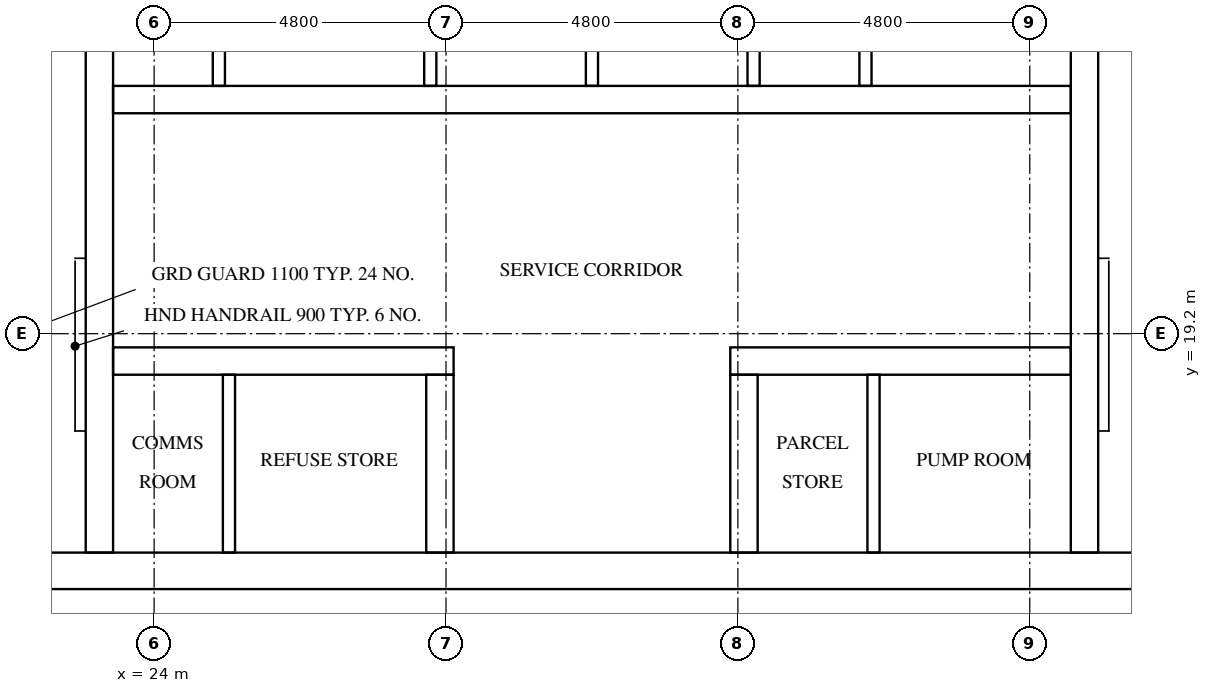
"""IFC4 building model, lengths in metres.
Left out: names, types, materials, properties, quantities, classifications, styles, units other than length and angle.
Written with IfcOpenShell. Run it as: python <this file> out.ifc"""

import sys

from ifc_helpers import new_model, si_unit, direction, frame, frame_2d, origin, place, context, subcontext, project, spatial, rectangle, extrude, element, fill, save


model = new_model("IFC4")
c1 = context("Model", 3, precision=1e-05, world=origin(), true_north=direction((0.0, 1.0)))
c2 = subcontext(c1, "Body", "Model", "MODEL_VIEW")
j1 = project(units=[si_unit("LENGTHUNIT", "METRE"), si_unit("PLANEANGLEUNIT", "RADIAN")], contexts=[c1])
p1 = place(None, origin())
s1 = spatial("IfcSite", under=j1, at=p1, CompositionType="ELEMENT")
p2 = place(p1, origin())
s2 = spatial("IfcBuilding", under=s1, at=p2, CompositionType="ELEMENT")
p3 = place(p2, frame((0.0, 0.0, 245.7)))
s3 = spatial("IfcBuildingStorey", under=s2, at=p3, CompositionType="ELEMENT", Elevation=245.7)
p4 = place(p3, frame((15.0, 15.3, 0.0), z_axis=(0.0, 0.0, 1.0), x_axis=(1.0, 0.0, 0.0)))
e1 = element("IfcWall", 1, at=p4, inside=s3, PredefinedType="SHEAR", context=c2, shape_type="SweptSolid", body=[
    extrude(rectangle(XDim=32.4, YDim=0.6, at=frame_2d((16.2, 0.0))), origin(), (0.0, 0.0, 1.0), 3.2),
])
p5 = place(p4, frame((15.3, 0.0, 0.0)))
e2 = element("IfcOpeningElement", 2, at=p5, cuts=e1, PredefinedType="OPENING", context=c2, shape_type="SweptSolid", body=[
    extrude(rectangle(XDim=1.8, YDim=2.1, at=frame_2d((0.9, 1.05))), frame((0.0, 0.31, 0.0), z_axis=(0.0, -1.0, 0.0), x_axis=(1.0, 0.0, 0.0)), (0.0, 0.0, 1.0), 0.62),
])
p6 = place(p3, frame((23.1, 15.6, 0.0), z_axis=(0.0, 0.0, 1.0), x_axis=(0.0, 1.0, 0.0)))
e3 = element("IfcWall", 3, at=p6, inside=s3, PredefinedType="SHEAR", context=c2, shape_type="SweptSolid", body=[
    extrude(rectangle(XDim=21.6, YDim=0.45, at=frame_2d((10.8, 0.0))), origin(), (0.0, 0.0, 1.0), 3.2),
])
p7 = place(p3, frame((39.3, 15.6, 0.0), z_axis=(0.0, 0.0, 1.0), x_axis=(0.0, 1.0, 0.0)))
e4 = element("IfcWall", 4, at=p7, inside=s3, PredefinedType="SHEAR", context=c2, shape_type="SweptSolid", body=[
    extrude(rectangle(XDim=8.65, YDim=0.45, at=frame_2d((4.325, 0.0))), origin(), (0.0, 0.0, 1.0), 3.2),
])
p8 = place(p3, frame((23.325, 18.75, 0.0), z_axis=(0.0, 0.0, 1.0), x_axis=(1.0, 0.0, 0.0)))
e5 = element("IfcWall", 5, at=p8, inside=s3, PredefinedType="SHEAR", context=c2, shape_type="SweptSolid", body=[
    extrude(rectangle(XDim=5.6, YDim=0.45, at=frame_2d((2.8, 0.0))), origin(), (0.0, 0.0, 1.0), 3.2),
])
p9 = place(p8, frame((0.403, 0.0, 0.0)))
e6 = element("IfcOpeningElement", 6, at=p9, cuts=e5, PredefinedType="OPENING", context=c2, shape_type="SweptSolid", body=[
    extrude(rectangle(XDim=1.0, YDim=2.1, at=frame_2d((0.5, 1.05))), frame((0.0, 0.235, 0.0), z_axis=(0.0, -1.0, 0.0), x_axis=(1.0, 0.0, 0.0)), (0.0, 0.0, 1.0), 0.47),
])
p10 = place(p8, frame((3.078, 0.0, 0.0)))
e7 = element("IfcOpeningElement", 7, at=p10, cuts=e5, PredefinedType="OPENING", context=c2, shape_type="SweptSolid", body=[
    extrude(rectangle(XDim=1.0, YDim=2.1, at=frame_2d((0.5, 1.05))), frame((0.0, 0.235, 0.0), z_axis=(0.0, -1.0, 0.0), x_axis=(1.0, 0.0, 0.0)), (0.0, 0.0, 1.0), 0.47),
])
p11 = place(p3, frame((33.475, 18.75, 0.0), z_axis=(0.0, 0.0, 1.0), x_axis=(1.0, 0.0, 0.0)))
e8 = element("IfcWall", 8, at=p11, inside=s3, PredefinedType="SHEAR", context=c2, shape_type="SweptSolid", body=[
    extrude(rectangle(XDim=5.6, YDim=0.45, at=frame_2d((2.8, 0.0))), origin(), (0.0, 0.0, 1.0), 3.2),
])
p12 = place(p11, frame((0.853, 0.0, 0.0)))
e9 = element("IfcOpeningElement", 9, at=p12, cuts=e8, PredefinedType="OPENING", context=c2, shape_type="SweptSolid", body=[
    extrude(rectangle(XDim=1.0, YDim=2.1, at=frame_2d((0.5, 1.05))), frame((0.0, 0.235, 0.0), z_axis=(0.0, -1.0, 0.0), x_axis=(1.0, 0.0, 0.0)), (0.0, 0.0, 1.0), 0.47),
])
p13 = place(p11, frame((3.528, 0.0, 0.0)))
e10 = element("IfcOpeningElement", 10, at=p13, cuts=e8, PredefinedType="OPENING", context=c2, shape_type="SweptSolid", body=[
    extrude(rectangle(XDim=1.0, YDim=2.1, at=frame_2d((0.5, 1.05))), frame((0.0, 0.235, 0.0), z_axis=(0.0, -1.0, 0.0), x_axis=(1.0, 0.0, 0.0)), (0.0, 0.0, 1.0), 0.47),
])
p14 = place(p3, frame((23.325, 23.05, 0.0), z_axis=(0.0, 0.0, 1.0), x_axis=(1.0, 0.0, 0.0)))
e11 = element("IfcWall", 11, at=p14, inside=s3, PredefinedType="SHEAR", context=c2, shape_type="SweptSolid", body=[
    extrude(rectangle(XDim=15.75, YDim=0.45, at=frame_2d((7.875, 0.0))), origin(), (0.0, 0.0, 1.0), 3.2),
])
p15 = place(p14, frame((0.32, 0.0, 0.0)))
e12 = element("IfcOpeningElement", 12, at=p15, cuts=e11, PredefinedType="OPENING", context=c2, shape_type="SweptSolid", body=[
    extrude(rectangle(XDim=1.0, YDim=2.1, at=frame_2d((0.5, 1.05))), frame((0.0, 0.235, 0.0), z_axis=(0.0, -1.0, 0.0), x_axis=(1.0, 0.0, 0.0)), (0.0, 0.0, 1.0), 0.47),
])
p16 = place(p14, frame((2.978, 0.0, 0.0)))
e13 = element("IfcOpeningElement", 13, at=p16, cuts=e11, PredefinedType="OPENING", context=c2, shape_type="SweptSolid", body=[
    extrude(rectangle(XDim=1.0, YDim=2.1, at=frame_2d((0.5, 1.05))), frame((0.0, 0.235, 0.0), z_axis=(0.0, -1.0, 0.0), x_axis=(1.0, 0.0, 0.0)), (0.0, 0.0, 1.0), 0.47),
])
p17 = place(p14, frame((10.953, 0.0, 0.0)))
e14 = element("IfcOpeningElement", 14, at=p17, cuts=e11, PredefinedType="OPENING", context=c2, shape_type="SweptSolid", body=[
    extrude(rectangle(XDim=1.0, YDim=2.1, at=frame_2d((0.5, 1.05))), frame((0.0, 0.235, 0.0), z_axis=(0.0, -1.0, 0.0), x_axis=(1.0, 0.0, 0.0)), (0.0, 0.0, 1.0), 0.47),
])
p18 = place(p14, frame((13.612, 0.0, 0.0)))
e15 = element("IfcOpeningElement", 15, at=p18, cuts=e11, PredefinedType="OPENING", context=c2, shape_type="SweptSolid", body=[
    extrude(rectangle(XDim=1.0, YDim=2.1, at=frame_2d((0.5, 1.05))), frame((0.0, 0.235, 0.0), z_axis=(0.0, -1.0, 0.0), x_axis=(1.0, 0.0, 0.0)), (0.0, 0.0, 1.0), 0.47),
])
for number, where, z_axis, x_axis in (
    (16, (28.7, 15.6, 0.0), (0.0, 0.0, 1.0), (0.0, 1.0, 0.0)),
    (17, (33.7, 15.6, 0.0), (0.0, 0.0, 1.0), (0.0, 1.0, 0.0)),
):
    element("IfcWall", number, at=place(p3, frame(where, z_axis=z_axis, x_axis=x_axis)), inside=s3, PredefinedType="SHEAR", context=c2, shape_type="SweptSolid", body=[
        extrude(rectangle(XDim=2.925, YDim=0.45, at=frame_2d((1.462, 0.0))), origin(), (0.0, 0.0, 1.0), 3.2),
    ])
for number, where, z_axis, x_axis in (
    (18, (28.542, 23.275, 0.0), (0.0, 0.0, 1.0), (0.0, 1.0, 0.0)),
    (19, (31.2, 23.275, 0.0), (0.0, 0.0, 1.0), (0.0, 1.0, 0.0)),
    (20, (33.858, 23.275, 0.0), (0.0, 0.0, 1.0), (0.0, 1.0, 0.0)),
):
    element("IfcWall", number, at=place(p3, frame(where, z_axis=z_axis, x_axis=x_axis)), inside=s3, PredefinedType="SOLIDWALL", context=c2, shape_type="SweptSolid", body=[
        extrude(rectangle(XDim=2.65, YDim=0.2, at=frame_2d((1.325, 0.0))), origin(), (0.0, 0.0, 1.0), 3.2),
    ])
for number, where, z_axis, x_axis in (
    (21, (25.065, 23.275, 0.0), (0.0, 0.0, 1.0), (0.0, 1.0, 0.0)),
    (22, (35.698, 23.275, 0.0), (0.0, 0.0, 1.0), (0.0, 1.0, 0.0)),
):
    element("IfcWall", number, at=place(p3, frame(where, z_axis=z_axis, x_axis=x_axis)), inside=s3, PredefinedType="PARTITIONING", context=c2, shape_type="SweptSolid", body=[
        extrude(rectangle(XDim=2.65, YDim=0.2, at=frame_2d((1.325, 0.0))), origin(), (0.0, 0.0, 1.0), 3.2),
    ])
for number, where, z_axis, x_axis in (
    (23, (25.23, 15.6, 0.0), (0.0, 0.0, 1.0), (0.0, 1.0, 0.0)),
    (24, (35.831, 15.6, 0.0), (0.0, 0.0, 1.0), (0.0, 1.0, 0.0)),
):
    element("IfcWall", number, at=place(p3, frame(where, z_axis=z_axis, x_axis=x_axis)), inside=s3, PredefinedType="PARTITIONING", context=c2, shape_type="SweptSolid", body=[
        extrude(rectangle(XDim=2.925, YDim=0.2, at=frame_2d((1.462, 0.0))), origin(), (0.0, 0.0, 1.0), 3.2),
    ])
p19 = place(p5, frame((1.8, 0.0, 0.0), z_axis=(0.0, 0.0, 1.0), x_axis=(-1.0, 0.0, 0.0)))
e25 = element("IfcDoor", 25, at=p19, inside=s3, OperationType="DOUBLE_DOOR_SINGLE_SWING", PredefinedType="DOOR", context=c2, shape_type="SweptSolid", body=[
    extrude(rectangle(XDim=1.8, YDim=2.1, at=frame_2d((0.9, 1.05))), frame((0.0, 0.025, 0.0), z_axis=(0.0, -1.0, 0.0), x_axis=(1.0, 0.0, 0.0)), (0.0, 0.0, 1.0), 0.05),
])
fill(e2, e25)
p20 = place(p15, frame((1.0, 0.0, 0.0), z_axis=(0.0, 0.0, 1.0), x_axis=(-1.0, 0.0, 0.0)))
e26 = element("IfcDoor", 26, at=p20, inside=s3, OperationType="SINGLE_SWING_LEFT", PredefinedType="DOOR", context=c2, shape_type="SweptSolid", body=[
    extrude(rectangle(XDim=1.0, YDim=2.1, at=frame_2d((0.5, 1.05))), frame((0.0, 0.025, 0.0), z_axis=(0.0, -1.0, 0.0), x_axis=(1.0, 0.0, 0.0)), (0.0, 0.0, 1.0), 0.05),
])
fill(e12, e26)
p21 = place(p16, frame((1.0, 0.0, 0.0), z_axis=(0.0, 0.0, 1.0), x_axis=(-1.0, 0.0, 0.0)))
e27 = element("IfcDoor", 27, at=p21, inside=s3, OperationType="SINGLE_SWING_RIGHT", PredefinedType="DOOR", context=c2, shape_type="SweptSolid", body=[
    extrude(rectangle(XDim=1.0, YDim=2.1, at=frame_2d((0.5, 1.05))), frame((0.0, 0.025, 0.0), z_axis=(0.0, -1.0, 0.0), x_axis=(1.0, 0.0, 0.0)), (0.0, 0.0, 1.0), 0.05),
])
fill(e13, e27)
p22 = place(p17, frame((1.0, 0.0, 0.0), z_axis=(0.0, 0.0, 1.0), x_axis=(-1.0, 0.0, 0.0)))
e28 = element("IfcDoor", 28, at=p22, inside=s3, OperationType="SINGLE_SWING_LEFT", PredefinedType="DOOR", context=c2, shape_type="SweptSolid", body=[
    extrude(rectangle(XDim=1.0, YDim=2.1, at=frame_2d((0.5, 1.05))), frame((0.0, 0.025, 0.0), z_axis=(0.0, -1.0, 0.0), x_axis=(1.0, 0.0, 0.0)), (0.0, 0.0, 1.0), 0.05),
])
fill(e14, e28)
p23 = place(p18, frame((1.0, 0.0, 0.0), z_axis=(0.0, 0.0, 1.0), x_axis=(-1.0, 0.0, 0.0)))
e29 = element("IfcDoor", 29, at=p23, inside=s3, OperationType="SINGLE_SWING_RIGHT", PredefinedType="DOOR", context=c2, shape_type="SweptSolid", body=[
    extrude(rectangle(XDim=1.0, YDim=2.1, at=frame_2d((0.5, 1.05))), frame((0.0, 0.025, 0.0), z_axis=(0.0, -1.0, 0.0), x_axis=(1.0, 0.0, 0.0)), (0.0, 0.0, 1.0), 0.05),
])
fill(e15, e29)
p24 = place(p9, origin())
e30 = element("IfcDoor", 30, at=p24, inside=s3, OperationType="SINGLE_SWING_LEFT", PredefinedType="DOOR", context=c2, shape_type="SweptSolid", body=[
    extrude(rectangle(XDim=1.0, YDim=2.1, at=frame_2d((0.5, 1.05))), frame((0.0, 0.025, 0.0), z_axis=(0.0, -1.0, 0.0), x_axis=(1.0, 0.0, 0.0)), (0.0, 0.0, 1.0), 0.05),
])
fill(e6, e30)
p25 = place(p10, origin())
e31 = element("IfcDoor", 31, at=p25, inside=s3, OperationType="SINGLE_SWING_RIGHT", PredefinedType="DOOR", context=c2, shape_type="SweptSolid", body=[
    extrude(rectangle(XDim=1.0, YDim=2.1, at=frame_2d((0.5, 1.05))), frame((0.0, 0.025, 0.0), z_axis=(0.0, -1.0, 0.0), x_axis=(1.0, 0.0, 0.0)), (0.0, 0.0, 1.0), 0.05),
])
fill(e7, e31)
p26 = place(p12, origin())
e32 = element("IfcDoor", 32, at=p26, inside=s3, OperationType="SINGLE_SWING_LEFT", PredefinedType="DOOR", context=c2, shape_type="SweptSolid", body=[
    extrude(rectangle(XDim=1.0, YDim=2.1, at=frame_2d((0.5, 1.05))), frame((0.0, 0.025, 0.0), z_axis=(0.0, -1.0, 0.0), x_axis=(1.0, 0.0, 0.0)), (0.0, 0.0, 1.0), 0.05),
])
fill(e9, e32)
p27 = place(p13, origin())
e33 = element("IfcDoor", 33, at=p27, inside=s3, OperationType="SINGLE_SWING_RIGHT", PredefinedType="DOOR", context=c2, shape_type="SweptSolid", body=[
    extrude(rectangle(XDim=1.0, YDim=2.1, at=frame_2d((0.5, 1.05))), frame((0.0, 0.025, 0.0), z_axis=(0.0, -1.0, 0.0), x_axis=(1.0, 0.0, 0.0)), (0.0, 0.0, 1.0), 0.05),
])
fill(e10, e33)
save(model, sys.argv[1])
